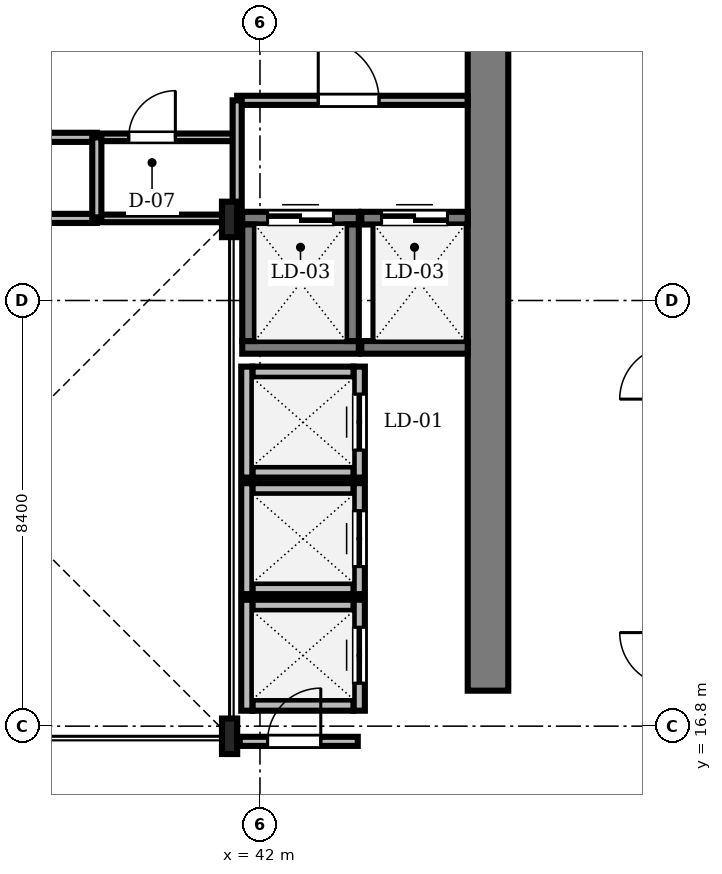
"""IFC4 building model, lengths in metres.
Left out: names, types, materials, properties, quantities, classifications, styles, units other than length and angle.
Written with IfcOpenShell. Run it as: python <this file> out.ifc"""

import sys

from ifc_helpers import new_model, si_unit, direction, frame, frame_2d, origin, origin_2d, place, context, subcontext, project, spatial, rectangle, i_section, extrude, source, transform, mapped, element, fill, save


model = new_model("IFC4")
c1 = context("Model", 3, precision=1e-05, world=origin(), true_north=direction((0.0, 1.0)))
c2 = subcontext(c1, "Body", "Model", "MODEL_VIEW")
j1 = project(units=[si_unit("LENGTHUNIT", "METRE"), si_unit("PLANEANGLEUNIT", "RADIAN")], contexts=[c1])
p1 = place(None, origin())
s1 = spatial("IfcSite", under=j1, at=p1, CompositionType="ELEMENT")
p2 = place(p1, origin())
s2 = spatial("IfcBuilding", under=s1, at=p2, CompositionType="ELEMENT")
p3 = place(p2, frame((0.0, 0.0, 177.2)))
s3 = spatial("IfcBuildingStorey", under=s2, at=p3, CompositionType="ELEMENT", Elevation=177.2)
m1 = source(origin(), c2, "Body", "SweptSolid", [
    extrude(rectangle(XDim=13.15, YDim=0.8, at=frame_2d((6.575, 0.0))), origin(), (0.0, 0.0, 1.0), 3.58),
])
p4 = place(p3, frame((46.5, 17.5, 0.0), z_axis=(0.0, 0.0, 1.0), x_axis=(0.0, 1.0, 0.0)))
e1 = element("IfcWall", 1, at=p4, inside=s3, PredefinedType="SHEAR", context=c2, shape_type="MappedRepresentation", body=[
    mapped(m1, transform((0.0, 0.0, 0.0), scale=1.0)),
])
m2 = source(origin(), c2, "Body", "SweptSolid", [
    extrude(i_section(OverallWidth=0.3, OverallDepth=0.7, WebThickness=0.017, FlangeThickness=0.032, FilletRadius=0.027, at=origin_2d()), origin(), (0.0, 0.0, 1.0), 3.58),
])
for number, where, z_axis, x_axis in (
    (2, (41.4, 16.6, 0.0), (0.0, 0.0, 1.0), (1.0, 0.0, 0.0)),
    (3, (41.4, 26.8, 0.0), (0.0, 0.0, 1.0), (1.0, 0.0, 0.0)),
):
    element("IfcColumn", number, at=place(p3, frame(where, z_axis=z_axis, x_axis=x_axis)), inside=s3, PredefinedType="COLUMN", context=c2, shape_type="MappedRepresentation", body=[
        mapped(m2, transform((0.0, 0.0, 0.0), scale=1.0)),
    ])
m3 = source(origin(), c2, "Body", "SweptSolid", [
    extrude(rectangle(XDim=2.0, YDim=0.22, at=frame_2d((1.0, 0.0))), origin(), (0.0, 0.0, 1.0), 3.58),
])
for number, where, z_axis, x_axis in (
    (4, (41.85, 21.815, 0.0), (0.0, 0.0, 1.0), (1.0, 0.0, 0.0)),
    (5, (41.85, 23.785, 0.0), (0.0, 0.0, 1.0), (1.0, 0.0, 0.0)),
):
    element("IfcWall", number, at=place(p3, frame(where, z_axis=z_axis, x_axis=x_axis)), inside=s3, PredefinedType="SOLIDWALL", context=c2, shape_type="MappedRepresentation", body=[
        mapped(m3, transform((0.0, 0.0, 0.0), scale=1.0)),
    ])
m4 = source(origin(), c2, "Body", "SweptSolid", [
    extrude(rectangle(XDim=2.19, YDim=0.22, at=frame_2d((1.095, 0.0))), origin(), (0.0, 0.0, 1.0), 3.58),
])
p5 = place(p3, frame((41.74, 21.705, 0.0), z_axis=(0.0, 0.0, 1.0), x_axis=(0.0, 1.0, 0.0)))
e6 = element("IfcWall", 6, at=p5, inside=s3, PredefinedType="SOLIDWALL", context=c2, shape_type="MappedRepresentation", body=[
    mapped(m4, transform((0.0, 0.0, 0.0), scale=1.0)),
])
p6 = place(p3, frame((43.96, 21.705, 0.0), z_axis=(0.0, 0.0, 1.0), x_axis=(0.0, 1.0, 0.0)))
e7 = element("IfcWall", 7, at=p6, inside=s3, PredefinedType="SOLIDWALL", context=c2, shape_type="MappedRepresentation", body=[
    mapped(m4, transform((0.0, 0.0, 0.0), scale=1.0)),
])
m5 = source(origin(), c2, "Body", "SweptSolid", [
    extrude(rectangle(XDim=1.1, YDim=2.2, at=frame_2d((0.55, 1.1))), frame((0.0, 0.12, 0.0), z_axis=(0.0, -1.0, 0.0), x_axis=(1.0, 0.0, 0.0)), (0.0, 0.0, 1.0), 0.24),
])
p7 = place(p6, frame((0.545, 0.0, 0.0)))
e8 = element("IfcOpeningElement", 8, at=p7, cuts=e7, PredefinedType="OPENING", context=c2, shape_type="MappedRepresentation", body=[
    mapped(m5, transform((0.0, 0.0, 0.0), scale=1.0)),
])
for number, where, z_axis, x_axis in (
    (9, (41.85, 19.515, 0.0), (0.0, 0.0, 1.0), (1.0, 0.0, 0.0)),
    (10, (41.85, 21.485, 0.0), (0.0, 0.0, 1.0), (1.0, 0.0, 0.0)),
):
    element("IfcWall", number, at=place(p3, frame(where, z_axis=z_axis, x_axis=x_axis)), inside=s3, PredefinedType="SOLIDWALL", context=c2, shape_type="MappedRepresentation", body=[
        mapped(m3, transform((0.0, 0.0, 0.0), scale=1.0)),
    ])
p8 = place(p3, frame((41.74, 19.405, 0.0), z_axis=(0.0, 0.0, 1.0), x_axis=(0.0, 1.0, 0.0)))
e11 = element("IfcWall", 11, at=p8, inside=s3, PredefinedType="SOLIDWALL", context=c2, shape_type="MappedRepresentation", body=[
    mapped(m4, transform((0.0, 0.0, 0.0), scale=1.0)),
])
p9 = place(p3, frame((43.96, 19.405, 0.0), z_axis=(0.0, 0.0, 1.0), x_axis=(0.0, 1.0, 0.0)))
e12 = element("IfcWall", 12, at=p9, inside=s3, PredefinedType="SOLIDWALL", context=c2, shape_type="MappedRepresentation", body=[
    mapped(m4, transform((0.0, 0.0, 0.0), scale=1.0)),
])
p10 = place(p9, frame((0.545, 0.0, 0.0)))
e13 = element("IfcOpeningElement", 13, at=p10, cuts=e12, PredefinedType="OPENING", context=c2, shape_type="MappedRepresentation", body=[
    mapped(m5, transform((0.0, 0.0, 0.0), scale=1.0)),
])
for number, where, z_axis, x_axis in (
    (14, (41.85, 17.215, 0.0), (0.0, 0.0, 1.0), (1.0, 0.0, 0.0)),
    (15, (41.85, 19.185, 0.0), (0.0, 0.0, 1.0), (1.0, 0.0, 0.0)),
):
    element("IfcWall", number, at=place(p3, frame(where, z_axis=z_axis, x_axis=x_axis)), inside=s3, PredefinedType="SOLIDWALL", context=c2, shape_type="MappedRepresentation", body=[
        mapped(m3, transform((0.0, 0.0, 0.0), scale=1.0)),
    ])
p11 = place(p3, frame((41.74, 17.105, 0.0), z_axis=(0.0, 0.0, 1.0), x_axis=(0.0, 1.0, 0.0)))
e16 = element("IfcWall", 16, at=p11, inside=s3, PredefinedType="SOLIDWALL", context=c2, shape_type="MappedRepresentation", body=[
    mapped(m4, transform((0.0, 0.0, 0.0), scale=1.0)),
])
p12 = place(p3, frame((43.96, 17.105, 0.0), z_axis=(0.0, 0.0, 1.0), x_axis=(0.0, 1.0, 0.0)))
e17 = element("IfcWall", 17, at=p12, inside=s3, PredefinedType="SOLIDWALL", context=c2, shape_type="MappedRepresentation", body=[
    mapped(m4, transform((0.0, 0.0, 0.0), scale=1.0)),
])
p13 = place(p12, frame((0.545, 0.0, 0.0)))
e18 = element("IfcOpeningElement", 18, at=p13, cuts=e17, PredefinedType="OPENING", context=c2, shape_type="MappedRepresentation", body=[
    mapped(m5, transform((0.0, 0.0, 0.0), scale=1.0)),
])
m6 = source(origin(), c2, "Body", "SweptSolid", [
    extrude(rectangle(XDim=2.3, YDim=0.25, at=frame_2d((1.15, 0.0))), origin(), (0.0, 0.0, 1.0), 3.58),
])
p14 = place(p3, frame((41.65, 24.275, 0.0), z_axis=(0.0, 0.0, 1.0), x_axis=(1.0, 0.0, 0.0)))
e19 = element("IfcWall", 19, at=p14, inside=s3, PredefinedType="SOLIDWALL", context=c2, shape_type="MappedRepresentation", body=[
    mapped(m6, transform((0.0, 0.0, 0.0), scale=1.0)),
])
p15 = place(p3, frame((41.65, 26.825, 0.0), z_axis=(0.0, 0.0, 1.0), x_axis=(1.0, 0.0, 0.0)))
e20 = element("IfcWall", 20, at=p15, inside=s3, PredefinedType="SOLIDWALL", context=c2, shape_type="MappedRepresentation", body=[
    mapped(m6, transform((0.0, 0.0, 0.0), scale=1.0)),
])
m7 = source(origin(), c2, "Body", "SweptSolid", [
    extrude(rectangle(XDim=1.3, YDim=2.3, at=frame_2d((0.65, 1.15))), frame((0.0, 0.135, 0.0), z_axis=(0.0, -1.0, 0.0), x_axis=(1.0, 0.0, 0.0)), (0.0, 0.0, 1.0), 0.27),
])
p16 = place(p15, frame((0.5, 0.0, 0.0)))
e21 = element("IfcOpeningElement", 21, at=p16, cuts=e20, PredefinedType="OPENING", context=c2, shape_type="MappedRepresentation", body=[
    mapped(m7, transform((0.0, 0.0, 0.0), scale=1.0)),
])
for number, where, z_axis, x_axis in (
    (22, (41.775, 24.4, 0.0), (0.0, 0.0, 1.0), (0.0, 1.0, 0.0)),
    (23, (43.825, 24.4, 0.0), (0.0, 0.0, 1.0), (0.0, 1.0, 0.0)),
):
    element("IfcWall", number, at=place(p3, frame(where, z_axis=z_axis, x_axis=x_axis)), inside=s3, PredefinedType="SOLIDWALL", context=c2, shape_type="MappedRepresentation", body=[
        mapped(m6, transform((0.0, 0.0, 0.0), scale=1.0)),
    ])
m8 = source(origin(), c2, "Body", "SweptSolid", [
    extrude(rectangle(XDim=2.1, YDim=0.25, at=frame_2d((1.05, 0.0))), origin(), (0.0, 0.0, 1.0), 3.58),
])
p17 = place(p3, frame((44.0, 24.275, 0.0), z_axis=(0.0, 0.0, 1.0), x_axis=(1.0, 0.0, 0.0)))
e24 = element("IfcWall", 24, at=p17, inside=s3, PredefinedType="SOLIDWALL", context=c2, shape_type="MappedRepresentation", body=[
    mapped(m8, transform((0.0, 0.0, 0.0), scale=1.0)),
])
p18 = place(p3, frame((44.0, 26.825, 0.0), z_axis=(0.0, 0.0, 1.0), x_axis=(1.0, 0.0, 0.0)))
e25 = element("IfcWall", 25, at=p18, inside=s3, PredefinedType="SOLIDWALL", context=c2, shape_type="MappedRepresentation", body=[
    mapped(m8, transform((0.0, 0.0, 0.0), scale=1.0)),
])
p19 = place(p18, frame((0.4, 0.0, 0.0)))
e26 = element("IfcOpeningElement", 26, at=p19, cuts=e25, PredefinedType="OPENING", context=c2, shape_type="MappedRepresentation", body=[
    mapped(m7, transform((0.0, 0.0, 0.0), scale=1.0)),
])
m9 = source(origin(), c2, "Body", "SweptSolid", [
    extrude(rectangle(XDim=7.33, YDim=0.18, at=frame_2d((3.665, 0.0))), origin(), (0.0, 0.0, 1.0), 3.212),
])
p20 = place(p3, frame((31.45, 28.42, 0.0), z_axis=(0.0, 0.0, 1.0), x_axis=(1.0, 0.0, 0.0)))
e27 = element("IfcWall", 27, at=p20, inside=s3, PredefinedType="PARTITIONING", context=c2, shape_type="MappedRepresentation", body=[
    mapped(m9, transform((0.0, 0.0, 0.0), scale=1.0)),
])
m10 = source(origin(), c2, "Body", "SweptSolid", [
    extrude(rectangle(XDim=0.95, YDim=2.15, at=frame_2d((0.475, 1.075))), frame((0.0, 0.1, 0.0), z_axis=(0.0, -1.0, 0.0), x_axis=(1.0, 0.0, 0.0)), (0.0, 0.0, 1.0), 0.2),
])
p21 = place(p20, frame((0.65, 0.0, 0.0)))
e28 = element("IfcOpeningElement", 28, at=p21, cuts=e27, PredefinedType="OPENING", context=c2, shape_type="MappedRepresentation", body=[
    mapped(m10, transform((0.0, 0.0, 0.0), scale=1.0)),
])
m11 = source(origin(), c2, "Body", "SweptSolid", [
    extrude(rectangle(XDim=4.548, YDim=0.18, at=frame_2d((2.274, 0.0))), origin(), (0.0, 0.0, 1.0), 3.212),
])
p22 = place(p3, frame((41.55, 29.15, 0.0), z_axis=(0.0, 0.0, 1.0), x_axis=(1.0, 0.0, 0.0)))
e29 = element("IfcWall", 29, at=p22, inside=s3, PredefinedType="PARTITIONING", context=c2, shape_type="MappedRepresentation", body=[
    mapped(m11, transform((0.0, 0.0, 0.0), scale=1.0)),
])
m12 = source(origin(), c2, "Body", "SweptSolid", [
    extrude(rectangle(XDim=1.2, YDim=2.2, at=frame_2d((0.6, 1.1))), frame((0.0, 0.1, 0.0), z_axis=(0.0, -1.0, 0.0), x_axis=(1.0, 0.0, 0.0)), (0.0, 0.0, 1.0), 0.2),
])
p23 = place(p22, frame((1.6, 0.0, 0.0)))
e30 = element("IfcOpeningElement", 30, at=p23, cuts=e29, PredefinedType="OPENING", context=c2, shape_type="MappedRepresentation", body=[
    mapped(m12, transform((0.0, 0.0, 0.0), scale=1.0)),
])
m13 = source(origin(), c2, "Body", "SweptSolid", [
    extrude(rectangle(XDim=2.74, YDim=0.15, at=frame_2d((1.37, 0.0))), origin(), (0.0, 0.0, 1.0), 3.58),
])
p24 = place(p3, frame((38.78, 28.42, 0.0), z_axis=(0.0, 0.0, 1.0), x_axis=(1.0, 0.0, 0.0)))
e31 = element("IfcWall", 31, at=p24, inside=s3, PredefinedType="PARTITIONING", context=c2, shape_type="MappedRepresentation", body=[
    mapped(m13, transform((0.0, 0.0, 0.0), scale=1.0)),
])
m14 = source(origin(), c2, "Body", "SweptSolid", [
    extrude(rectangle(XDim=0.92, YDim=2.1, at=frame_2d((0.46, 1.05))), frame((0.0, 0.085, 0.0), z_axis=(0.0, -1.0, 0.0), x_axis=(1.0, 0.0, 0.0)), (0.0, 0.0, 1.0), 0.17),
])
p25 = place(p24, frame((0.63, 0.0, 0.0)))
e32 = element("IfcOpeningElement", 32, at=p25, cuts=e31, PredefinedType="OPENING", context=c2, shape_type="MappedRepresentation", body=[
    mapped(m14, transform((0.0, 0.0, 0.0), scale=1.0)),
])
m15 = source(origin(), c2, "Body", "SweptSolid", [
    extrude(rectangle(XDim=2.33, YDim=0.18, at=frame_2d((1.165, 0.0))), origin(), (0.0, 0.0, 1.0), 3.022),
])
p26 = place(p3, frame((41.6, 16.5, 0.0), z_axis=(0.0, 0.0, 1.0), x_axis=(1.0, 0.0, 0.0)))
e33 = element("IfcWall", 33, at=p26, inside=s3, PredefinedType="PARTITIONING", context=c2, shape_type="MappedRepresentation", body=[
    mapped(m15, transform((0.0, 0.0, 0.0), scale=1.0)),
])
m16 = source(origin(), c2, "Body", "SweptSolid", [
    extrude(rectangle(XDim=1.05, YDim=2.2, at=frame_2d((0.525, 1.1))), frame((0.0, 0.1, 0.0), z_axis=(0.0, -1.0, 0.0), x_axis=(1.0, 0.0, 0.0)), (0.0, 0.0, 1.0), 0.2),
])
p27 = place(p26, frame((0.55, 0.0, 0.0)))
e34 = element("IfcOpeningElement", 34, at=p27, cuts=e33, PredefinedType="OPENING", context=c2, shape_type="MappedRepresentation", body=[
    mapped(m16, transform((0.0, 0.0, 0.0), scale=1.0)),
])
m17 = source(origin(), c2, "Body", "SweptSolid", [
    extrude(rectangle(XDim=7.33, YDim=0.18, at=frame_2d((3.665, 0.0))), origin(), (0.0, 0.0, 1.0), 3.122),
])
p28 = place(p3, frame((31.45, 26.82, 0.0), z_axis=(0.0, 0.0, 1.0), x_axis=(1.0, 0.0, 0.0)))
e35 = element("IfcWall", 35, at=p28, inside=s3, PredefinedType="PARTITIONING", context=c2, shape_type="MappedRepresentation", body=[
    mapped(m17, transform((0.0, 0.0, 0.0), scale=1.0)),
])
m18 = source(origin(), c2, "Body", "SweptSolid", [
    extrude(rectangle(XDim=2.74, YDim=0.15, at=frame_2d((1.37, 0.0))), origin(), (0.0, 0.0, 1.0), 3.022),
])
p29 = place(p3, frame((38.78, 26.82, 0.0), z_axis=(0.0, 0.0, 1.0), x_axis=(1.0, 0.0, 0.0)))
e36 = element("IfcWall", 36, at=p29, inside=s3, PredefinedType="PARTITIONING", context=c2, shape_type="MappedRepresentation", body=[
    mapped(m18, transform((0.0, 0.0, 0.0), scale=1.0)),
])
m19 = source(origin(), c2, "Body", "SweptSolid", [
    extrude(rectangle(XDim=2.35, YDim=0.18, at=frame_2d((1.175, 0.0))), origin(), (0.0, 0.0, 1.0), 3.022),
])
p30 = place(p3, frame((41.55, 26.8, 0.0), z_axis=(0.0, 0.0, 1.0), x_axis=(0.0, 1.0, 0.0)))
e37 = element("IfcWall", 37, at=p30, inside=s3, PredefinedType="PARTITIONING", context=c2, shape_type="MappedRepresentation", body=[
    mapped(m19, transform((0.0, 0.0, 0.0), scale=1.0)),
])
m20 = source(origin(), c2, "Body", "SweptSolid", [
    extrude(rectangle(XDim=1.6, YDim=0.18, at=frame_2d((0.8, 0.0))), origin(), (0.0, 0.0, 1.0), 3.122),
])
p31 = place(p3, frame((38.78, 26.82, 0.0), z_axis=(0.0, 0.0, 1.0), x_axis=(0.0, 1.0, 0.0)))
e38 = element("IfcWall", 38, at=p31, inside=s3, PredefinedType="PARTITIONING", context=c2, shape_type="MappedRepresentation", body=[
    mapped(m20, transform((0.0, 0.0, 0.0), scale=1.0)),
])
m21 = source(origin(), c2, "Body", "SweptSolid", [
    extrude(rectangle(XDim=1.1, YDim=2.2, at=frame_2d((0.55, 1.1))), frame((0.0, 0.025, 0.0), z_axis=(0.0, -1.0, 0.0), x_axis=(1.0, 0.0, 0.0)), (0.0, 0.0, 1.0), 0.05),
])
p32 = place(p7, origin())
e39 = element("IfcDoor", 39, at=p32, inside=s3, OperationType="DOUBLE_DOOR_SLIDING", PredefinedType="DOOR", context=c2, shape_type="MappedRepresentation", body=[
    mapped(m21, transform((0.0, 0.0, 0.0), scale=1.0)),
])
fill(e8, e39)
p33 = place(p10, origin())
e40 = element("IfcDoor", 40, at=p33, inside=s3, OperationType="DOUBLE_DOOR_SLIDING", PredefinedType="DOOR", context=c2, shape_type="MappedRepresentation", body=[
    mapped(m21, transform((0.0, 0.0, 0.0), scale=1.0)),
])
fill(e13, e40)
p34 = place(p13, origin())
e41 = element("IfcDoor", 41, at=p34, inside=s3, OperationType="DOUBLE_DOOR_SLIDING", PredefinedType="DOOR", context=c2, shape_type="MappedRepresentation", body=[
    mapped(m21, transform((0.0, 0.0, 0.0), scale=1.0)),
])
fill(e18, e41)
m22 = source(origin(), c2, "Body", "SweptSolid", [
    extrude(rectangle(XDim=1.3, YDim=2.3, at=frame_2d((0.65, 1.15))), frame((0.0, 0.025, 0.0), z_axis=(0.0, -1.0, 0.0), x_axis=(1.0, 0.0, 0.0)), (0.0, 0.0, 1.0), 0.05),
])
p35 = place(p16, origin())
e42 = element("IfcDoor", 42, at=p35, inside=s3, OperationType="DOUBLE_DOOR_SLIDING", PredefinedType="DOOR", context=c2, shape_type="MappedRepresentation", body=[
    mapped(m22, transform((0.0, 0.0, 0.0), scale=1.0)),
])
fill(e21, e42)
p36 = place(p19, origin())
e43 = element("IfcDoor", 43, at=p36, inside=s3, OperationType="DOUBLE_DOOR_SLIDING", PredefinedType="DOOR", context=c2, shape_type="MappedRepresentation", body=[
    mapped(m22, transform((0.0, 0.0, 0.0), scale=1.0)),
])
fill(e26, e43)
m23 = source(origin(), c2, "Body", "SweptSolid", [
    extrude(rectangle(XDim=1.2, YDim=2.2, at=frame_2d((0.6, 1.1))), frame((0.0, 0.025, 0.0), z_axis=(0.0, -1.0, 0.0), x_axis=(1.0, 0.0, 0.0)), (0.0, 0.0, 1.0), 0.05),
])
p37 = place(p23, origin())
e44 = element("IfcDoor", 44, at=p37, inside=s3, OperationType="SINGLE_SWING_LEFT", PredefinedType="DOOR", context=c2, shape_type="MappedRepresentation", body=[
    mapped(m23, transform((0.0, 0.0, 0.0), scale=1.0)),
])
fill(e30, e44)
m24 = source(origin(), c2, "Body", "SweptSolid", [
    extrude(rectangle(XDim=0.92, YDim=2.1, at=frame_2d((0.46, 1.05))), frame((0.0, 0.025, 0.0), z_axis=(0.0, -1.0, 0.0), x_axis=(1.0, 0.0, 0.0)), (0.0, 0.0, 1.0), 0.05),
])
p38 = place(p25, origin())
e45 = element("IfcDoor", 45, at=p38, inside=s3, OperationType="SINGLE_SWING_RIGHT", PredefinedType="DOOR", context=c2, shape_type="MappedRepresentation", body=[
    mapped(m24, transform((0.0, 0.0, 0.0), scale=1.0)),
])
fill(e32, e45)
m25 = source(origin(), c2, "Body", "SweptSolid", [
    extrude(rectangle(XDim=1.05, YDim=2.2, at=frame_2d((0.525, 1.1))), frame((0.0, 0.025, 0.0), z_axis=(0.0, -1.0, 0.0), x_axis=(1.0, 0.0, 0.0)), (0.0, 0.0, 1.0), 0.05),
])
p39 = place(p27, origin())
e46 = element("IfcDoor", 46, at=p39, inside=s3, OperationType="SINGLE_SWING_RIGHT", PredefinedType="DOOR", context=c2, shape_type="MappedRepresentation", body=[
    mapped(m25, transform((0.0, 0.0, 0.0), scale=1.0)),
])
fill(e34, e46)
save(model, sys.argv[1])
